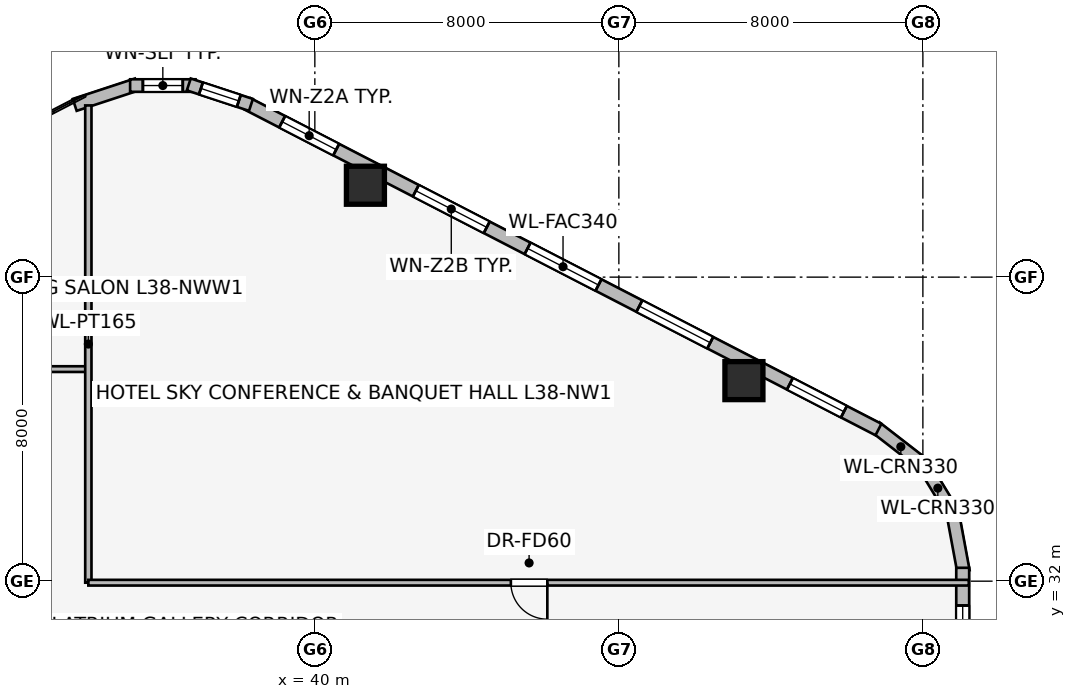
"""IFC4 building model, lengths in metres.
Left out: names, types, materials, properties, quantities, classifications, styles, units other than length and angle.
Written with IfcOpenShell. Run it as: python <this file> out.ifc"""

import sys

from ifc_helpers import new_model, si_unit, direction, frame, frame_2d, origin, origin_2d, place, context, subcontext, project, spatial, rectangle, extrude, element, fill, save


model = new_model("IFC4")
c1 = context("Model", 3, precision=1e-05, world=origin(), true_north=direction((0.0, 1.0)))
c2 = subcontext(c1, "Body", "Model", "MODEL_VIEW")
j1 = project(units=[si_unit("LENGTHUNIT", "METRE"), si_unit("PLANEANGLEUNIT", "RADIAN")], contexts=[c1])
p1 = place(None, origin())
s1 = spatial("IfcSite", under=j1, at=p1, CompositionType="ELEMENT")
p2 = place(p1, origin())
s2 = spatial("IfcBuilding", under=s1, at=p2, CompositionType="ELEMENT")
p3 = place(p2, frame((0.0, 0.0, 142.95)))
s3 = spatial("IfcBuildingStorey", under=s2, at=p3, CompositionType="ELEMENT", Elevation=142.95)
for number, where, z_axis, x_axis in (
    (1, (51.291, 37.277, 0.0), (0.0, 0.0, 1.0), (1.0, 0.0, 0.0)),
    (2, (41.331, 42.418, 0.0), (0.0, 0.0, 1.0), (1.0, 0.0, 0.0)),
):
    element("IfcColumn", number, at=place(p3, frame(where, z_axis=z_axis, x_axis=x_axis)), inside=s3, PredefinedType="COLUMN", context=c2, shape_type="SweptSolid", body=[
        extrude(rectangle(XDim=1.0, YDim=1.0, at=origin_2d()), origin(), (0.0, 0.0, 1.0), 3.45),
    ])
p4 = place(p3, frame((54.757, 36.05, 0.0), z_axis=(0.0, 0.0, 1.0), x_axis=(0.790621329885, -0.612305408053, 0.0)))
e3 = element("IfcWall", 3, at=p4, inside=s3, PredefinedType="STANDARD", context=c2, shape_type="SweptSolid", body=[
    extrude(rectangle(XDim=1.676, YDim=0.33, at=frame_2d((0.838, 0.0))), origin(), (0.0, 0.0, 1.0), 3.16),
])
p5 = place(p3, frame((55.957, 35.164, 0.0), z_axis=(0.0, 0.0, 1.0), x_axis=(0.520519429557, -0.853849824883, 0.0)))
e4 = element("IfcWall", 4, at=p5, inside=s3, PredefinedType="STANDARD", context=c2, shape_type="SweptSolid", body=[
    extrude(rectangle(XDim=1.677, YDim=0.33, at=frame_2d((0.839, 0.0))), origin(), (0.0, 0.0, 1.0), 3.16),
])
p6 = place(p3, frame((56.763, 33.907, 0.0), z_axis=(0.0, 0.0, 1.0), x_axis=(0.181984991895, -0.983301308209, 0.0)))
e5 = element("IfcWall", 5, at=p6, inside=s3, PredefinedType="STANDARD", context=c2, shape_type="SweptSolid", body=[
    extrude(rectangle(XDim=1.677, YDim=0.33, at=frame_2d((0.838, 0.0))), origin(), (0.0, 0.0, 1.0), 3.16),
])
p7 = place(p3, frame((38.231, 44.558, 0.0), z_axis=(0.0, 0.0, 1.0), x_axis=(0.888613612362, -0.458656568606, 0.0)))
e6 = element("IfcWall", 6, at=p7, inside=s3, PredefinedType="STANDARD", context=c2, shape_type="SweptSolid", body=[
    extrude(rectangle(XDim=18.681, YDim=0.34, at=frame_2d((9.34, 0.0))), origin(), (0.0, 0.0, 1.0), 3.16),
])
p8 = place(p7, frame((1.023, 0.0, 0.75)))
e7 = element("IfcOpeningElement", 7, at=p8, cuts=e6, PredefinedType="OPENING", context=c2, shape_type="SweptSolid", body=[
    extrude(rectangle(XDim=1.6, YDim=1.55, at=frame_2d((0.8, 0.775))), frame((0.0, 0.18, 0.0), z_axis=(0.0, -1.0, 0.0), x_axis=(1.0, 0.0, 0.0)), (0.0, 0.0, 1.0), 0.36),
])
p9 = place(p7, frame((4.981, 0.0, 0.75)))
e8 = element("IfcOpeningElement", 8, at=p9, cuts=e6, PredefinedType="OPENING", context=c2, shape_type="SweptSolid", body=[
    extrude(rectangle(XDim=2.1, YDim=1.5, at=frame_2d((1.05, 0.75))), frame((0.0, 0.18, 0.0), z_axis=(0.0, -1.0, 0.0), x_axis=(1.0, 0.0, 0.0)), (0.0, 0.0, 1.0), 0.36),
])
p10 = place(p7, frame((8.29, 0.0, 0.75)))
e9 = element("IfcOpeningElement", 9, at=p10, cuts=e6, PredefinedType="OPENING", context=c2, shape_type="SweptSolid", body=[
    extrude(rectangle(XDim=2.1, YDim=1.5, at=frame_2d((1.05, 0.75))), frame((0.0, 0.18, 0.0), z_axis=(0.0, -1.0, 0.0), x_axis=(1.0, 0.0, 0.0)), (0.0, 0.0, 1.0), 0.36),
])
p11 = place(p7, frame((11.6, 0.0, 0.75)))
e10 = element("IfcOpeningElement", 10, at=p11, cuts=e6, PredefinedType="OPENING", context=c2, shape_type="SweptSolid", body=[
    extrude(rectangle(XDim=2.1, YDim=1.5, at=frame_2d((1.05, 0.75))), frame((0.0, 0.18, 0.0), z_axis=(0.0, -1.0, 0.0), x_axis=(1.0, 0.0, 0.0)), (0.0, 0.0, 1.0), 0.36),
])
p12 = place(p7, frame((16.058, 0.0, 0.75)))
e11 = element("IfcOpeningElement", 11, at=p12, cuts=e6, PredefinedType="OPENING", context=c2, shape_type="SweptSolid", body=[
    extrude(rectangle(XDim=1.6, YDim=1.55, at=frame_2d((0.8, 0.775))), frame((0.0, 0.18, 0.0), z_axis=(0.0, -1.0, 0.0), x_axis=(1.0, 0.0, 0.0)), (0.0, 0.0, 1.0), 0.36),
])
p13 = place(p3, frame((33.681, 44.532, 0.0), z_axis=(0.0, 0.0, 1.0), x_axis=(0.949937416267, 0.312440242569, 0.0)))
e12 = element("IfcWall", 12, at=p13, inside=s3, PredefinedType="STANDARD", context=c2, shape_type="SweptSolid", body=[
    extrude(rectangle(XDim=1.722, YDim=0.33, at=frame_2d((0.861, 0.0))), origin(), (0.0, 0.0, 1.0), 3.16),
])
p14 = place(p3, frame((35.139, 45.041, 0.0), z_axis=(0.0, 0.0, 1.0), x_axis=(1.0, 0.0, 0.0)))
e13 = element("IfcWall", 13, at=p14, inside=s3, PredefinedType="STANDARD", context=c2, shape_type="SweptSolid", body=[
    extrude(rectangle(XDim=1.722, YDim=0.33, at=frame_2d((0.861, 0.0))), origin(), (0.0, 0.0, 1.0), 3.16),
])
p15 = place(p14, frame((0.336, 0.0, 0.75)))
e14 = element("IfcOpeningElement", 14, at=p15, cuts=e13, PredefinedType="OPENING", context=c2, shape_type="SweptSolid", body=[
    extrude(rectangle(XDim=1.05, YDim=1.4, at=frame_2d((0.525, 0.7))), frame((0.0, 0.175, 0.0), z_axis=(0.0, -1.0, 0.0), x_axis=(1.0, 0.0, 0.0)), (0.0, 0.0, 1.0), 0.35),
])
p16 = place(p3, frame((36.683, 45.07, 0.0), z_axis=(0.0, 0.0, 1.0), x_axis=(0.949937416267, -0.312440242569, 0.0)))
e15 = element("IfcWall", 15, at=p16, inside=s3, PredefinedType="STANDARD", context=c2, shape_type="SweptSolid", body=[
    extrude(rectangle(XDim=1.722, YDim=0.33, at=frame_2d((0.861, 0.0))), origin(), (0.0, 0.0, 1.0), 3.16),
])
p17 = place(p16, frame((0.336, 0.0, 0.75)))
e16 = element("IfcOpeningElement", 16, at=p17, cuts=e15, PredefinedType="OPENING", context=c2, shape_type="SweptSolid", body=[
    extrude(rectangle(XDim=1.05, YDim=1.4, at=frame_2d((0.525, 0.7))), frame((0.0, 0.175, 0.0), z_axis=(0.0, -1.0, 0.0), x_axis=(1.0, 0.0, 0.0)), (0.0, 0.0, 1.0), 0.35),
])
p18 = place(p3, frame((57.048, 32.352, 0.0), z_axis=(0.0, 0.0, 1.0), x_axis=(0.0, -1.0, 0.0)))
e17 = element("IfcWall", 17, at=p18, inside=s3, PredefinedType="STANDARD", context=c2, shape_type="SweptSolid", body=[
    extrude(rectangle(XDim=16.704, YDim=0.34, at=frame_2d((8.352, 0.0))), origin(), (0.0, 0.0, 1.0), 3.16),
])
p19 = place(p18, frame((0.992, 0.0, 0.75)))
e18 = element("IfcOpeningElement", 18, at=p19, cuts=e17, PredefinedType="OPENING", context=c2, shape_type="SweptSolid", body=[
    extrude(rectangle(XDim=1.05, YDim=1.4, at=frame_2d((0.525, 0.7))), frame((0.0, 0.18, 0.0), z_axis=(0.0, -1.0, 0.0), x_axis=(1.0, 0.0, 0.0)), (0.0, 0.0, 1.0), 0.36),
])
p20 = place(p18, frame((4.935, 0.0, 0.75)))
e19 = element("IfcOpeningElement", 19, at=p20, cuts=e17, PredefinedType="OPENING", context=c2, shape_type="SweptSolid", body=[
    extrude(rectangle(XDim=2.1, YDim=1.5, at=frame_2d((1.05, 0.75))), frame((0.0, 0.18, 0.0), z_axis=(0.0, -1.0, 0.0), x_axis=(1.0, 0.0, 0.0)), (0.0, 0.0, 1.0), 0.36),
])
p21 = place(p18, frame((9.919, 0.0, 0.75)))
e20 = element("IfcOpeningElement", 20, at=p21, cuts=e17, PredefinedType="OPENING", context=c2, shape_type="SweptSolid", body=[
    extrude(rectangle(XDim=1.6, YDim=1.55, at=frame_2d((0.8, 0.775))), frame((0.0, 0.18, 0.0), z_axis=(0.0, -1.0, 0.0), x_axis=(1.0, 0.0, 0.0)), (0.0, 0.0, 1.0), 0.36),
])
p22 = place(p18, frame((14.702, 0.0, 0.75)))
e21 = element("IfcOpeningElement", 21, at=p22, cuts=e17, PredefinedType="OPENING", context=c2, shape_type="SweptSolid", body=[
    extrude(rectangle(XDim=1.05, YDim=1.4, at=frame_2d((0.525, 0.7))), frame((0.0, 0.18, 0.0), z_axis=(0.0, -1.0, 0.0), x_axis=(1.0, 0.0, 0.0)), (0.0, 0.0, 1.0), 0.36),
])
p23 = place(p3, frame((34.0, 37.58, 0.0), z_axis=(0.0, 0.0, 1.0), x_axis=(-1.0, 0.0, 0.0)))
e22 = element("IfcWall", 22, at=p23, inside=s3, PredefinedType="PARTITIONING", context=c2, shape_type="SweptSolid", body=[
    extrude(rectangle(XDim=13.707, YDim=0.15, at=frame_2d((6.854, 0.0))), origin(), (0.0, 0.0, 1.0), 2.627),
])
p24 = place(p23, frame((5.195, 0.0, 0.0)))
e23 = element("IfcOpeningElement", 23, at=p24, cuts=e22, PredefinedType="OPENING", context=c2, shape_type="SweptSolid", body=[
    extrude(rectangle(XDim=0.96, YDim=2.0, at=frame_2d((0.48, 1.0))), frame((0.0, 0.085, 0.0), z_axis=(0.0, -1.0, 0.0), x_axis=(1.0, 0.0, 0.0)), (0.0, 0.0, 1.0), 0.17),
])
p25 = place(p3, frame((34.04, 31.96, 0.0), z_axis=(0.0, 0.0, 1.0), x_axis=(0.0, 1.0, 0.0)))
e24 = element("IfcWall", 24, at=p25, inside=s3, PredefinedType="PARTITIONING", context=c2, shape_type="SweptSolid", body=[
    extrude(rectangle(XDim=12.558, YDim=0.165, at=frame_2d((6.279, 0.0))), origin(), (0.0, 0.0, 1.0), 3.16),
])
p26 = place(p3, frame((57.208, 31.96, 0.0), z_axis=(0.0, 0.0, 1.0), x_axis=(-1.0, 0.0, 0.0)))
e25 = element("IfcWall", 25, at=p26, inside=s3, PredefinedType="PARTITIONING", context=c2, shape_type="SweptSolid", body=[
    extrude(rectangle(XDim=23.168, YDim=0.15, at=frame_2d((11.584, 0.0))), origin(), (0.0, 0.0, 1.0), 3.16),
])
p27 = place(p26, frame((11.09, 0.0, 0.0)))
e26 = element("IfcOpeningElement", 26, at=p27, cuts=e25, PredefinedType="OPENING", context=c2, shape_type="SweptSolid", body=[
    extrude(rectangle(XDim=0.96, YDim=2.0, at=frame_2d((0.48, 1.0))), frame((0.0, 0.085, 0.0), z_axis=(0.0, -1.0, 0.0), x_axis=(1.0, 0.0, 0.0)), (0.0, 0.0, 1.0), 0.17),
])
p28 = place(p8, origin())
e27 = element("IfcWindow", 27, at=p28, inside=s3, PartitioningType="SINGLE_PANEL", PredefinedType="WINDOW", context=c2, shape_type="SweptSolid", body=[
    extrude(rectangle(XDim=1.6, YDim=1.55, at=frame_2d((0.8, 0.775))), frame((0.0, 0.03, 0.0), z_axis=(0.0, -1.0, 0.0), x_axis=(1.0, 0.0, 0.0)), (0.0, 0.0, 1.0), 0.06),
])
fill(e7, e27)
p29 = place(p9, origin())
e28 = element("IfcWindow", 28, at=p29, inside=s3, PartitioningType="SINGLE_PANEL", PredefinedType="WINDOW", context=c2, shape_type="SweptSolid", body=[
    extrude(rectangle(XDim=2.1, YDim=1.5, at=frame_2d((1.05, 0.75))), frame((0.0, 0.03, 0.0), z_axis=(0.0, -1.0, 0.0), x_axis=(1.0, 0.0, 0.0)), (0.0, 0.0, 1.0), 0.06),
])
fill(e8, e28)
p30 = place(p10, origin())
e29 = element("IfcWindow", 29, at=p30, inside=s3, PartitioningType="SINGLE_PANEL", PredefinedType="WINDOW", context=c2, shape_type="SweptSolid", body=[
    extrude(rectangle(XDim=2.1, YDim=1.5, at=frame_2d((1.05, 0.75))), frame((0.0, 0.03, 0.0), z_axis=(0.0, -1.0, 0.0), x_axis=(1.0, 0.0, 0.0)), (0.0, 0.0, 1.0), 0.06),
])
fill(e9, e29)
p31 = place(p11, origin())
e30 = element("IfcWindow", 30, at=p31, inside=s3, PartitioningType="SINGLE_PANEL", PredefinedType="WINDOW", context=c2, shape_type="SweptSolid", body=[
    extrude(rectangle(XDim=2.1, YDim=1.5, at=frame_2d((1.05, 0.75))), frame((0.0, 0.03, 0.0), z_axis=(0.0, -1.0, 0.0), x_axis=(1.0, 0.0, 0.0)), (0.0, 0.0, 1.0), 0.06),
])
fill(e10, e30)
p32 = place(p12, origin())
e31 = element("IfcWindow", 31, at=p32, inside=s3, PartitioningType="SINGLE_PANEL", PredefinedType="WINDOW", context=c2, shape_type="SweptSolid", body=[
    extrude(rectangle(XDim=1.6, YDim=1.55, at=frame_2d((0.8, 0.775))), frame((0.0, 0.03, 0.0), z_axis=(0.0, -1.0, 0.0), x_axis=(1.0, 0.0, 0.0)), (0.0, 0.0, 1.0), 0.06),
])
fill(e11, e31)
p33 = place(p15, origin())
e32 = element("IfcWindow", 32, at=p33, inside=s3, PartitioningType="SINGLE_PANEL", PredefinedType="WINDOW", context=c2, shape_type="SweptSolid", body=[
    extrude(rectangle(XDim=1.05, YDim=1.4, at=frame_2d((0.525, 0.7))), frame((0.0, 0.03, 0.0), z_axis=(0.0, -1.0, 0.0), x_axis=(1.0, 0.0, 0.0)), (0.0, 0.0, 1.0), 0.06),
])
fill(e14, e32)
p34 = place(p17, origin())
e33 = element("IfcWindow", 33, at=p34, inside=s3, PartitioningType="SINGLE_PANEL", PredefinedType="WINDOW", context=c2, shape_type="SweptSolid", body=[
    extrude(rectangle(XDim=1.05, YDim=1.4, at=frame_2d((0.525, 0.7))), frame((0.0, 0.03, 0.0), z_axis=(0.0, -1.0, 0.0), x_axis=(1.0, 0.0, 0.0)), (0.0, 0.0, 1.0), 0.06),
])
fill(e16, e33)
p35 = place(p19, origin())
e34 = element("IfcWindow", 34, at=p35, inside=s3, PartitioningType="SINGLE_PANEL", PredefinedType="WINDOW", context=c2, shape_type="SweptSolid", body=[
    extrude(rectangle(XDim=1.05, YDim=1.4, at=frame_2d((0.525, 0.7))), frame((0.0, 0.03, 0.0), z_axis=(0.0, -1.0, 0.0), x_axis=(1.0, 0.0, 0.0)), (0.0, 0.0, 1.0), 0.06),
])
fill(e18, e34)
p36 = place(p27, origin())
e35 = element("IfcDoor", 35, at=p36, inside=s3, OperationType="SINGLE_SWING_LEFT", PredefinedType="DOOR", context=c2, shape_type="SweptSolid", body=[
    extrude(rectangle(XDim=0.96, YDim=2.0, at=frame_2d((0.48, 1.0))), frame((0.0, 0.025, 0.0), z_axis=(0.0, -1.0, 0.0), x_axis=(1.0, 0.0, 0.0)), (0.0, 0.0, 1.0), 0.05),
])
fill(e26, e35)
save(model, sys.argv[1])
